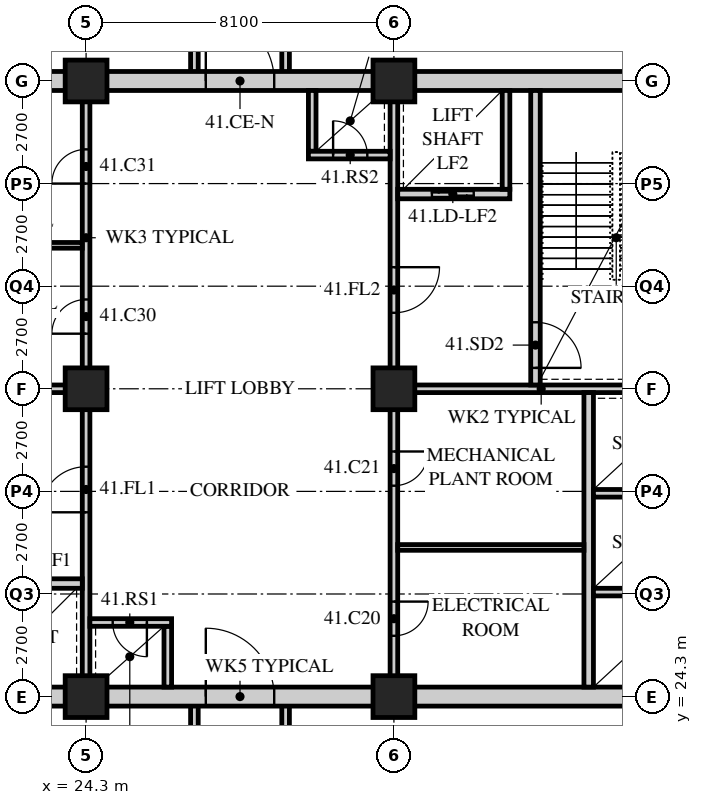
"""IFC4 building model, lengths in metres.
Left out: names, types, materials, properties, quantities, classifications, styles, units other than length and angle.
Written with IfcOpenShell. Run it as: python <this file> out.ifc"""

import sys

from ifc_helpers import new_model, si_unit, direction, frame, frame_2d, origin, origin_2d, place, context, subcontext, project, spatial, rectangle, hollow_rectangle, extrude, element, fill, save


model = new_model("IFC4")
c1 = context("Model", 3, precision=1e-05, world=origin(), true_north=direction((0.0, 1.0)))
c2 = subcontext(c1, "Body", "Model", "MODEL_VIEW")
j1 = project(units=[si_unit("LENGTHUNIT", "METRE"), si_unit("PLANEANGLEUNIT", "RADIAN")], contexts=[c1])
p1 = place(None, origin())
s1 = spatial("IfcSite", under=j1, at=p1, CompositionType="ELEMENT")
p2 = place(p1, origin())
s2 = spatial("IfcBuilding", under=s1, at=p2, CompositionType="ELEMENT")
p3 = place(p2, frame((0.0, 0.0, 157.8)))
s3 = spatial("IfcBuildingStorey", under=s2, at=p3, CompositionType="ELEMENT", Elevation=157.8)
for number, where, z_axis, x_axis in (
    (1, (24.3, 24.3, 0.0), (0.0, 0.0, 1.0), (1.0, 0.0, 0.0)),
    (2, (24.3, 32.4, 0.0), (0.0, 0.0, 1.0), (1.0, 0.0, 0.0)),
    (3, (24.3, 40.5, 0.0), (0.0, 0.0, 1.0), (1.0, 0.0, 0.0)),
    (4, (32.4, 24.3, 0.0), (0.0, 0.0, 1.0), (1.0, 0.0, 0.0)),
    (5, (32.4, 32.4, 0.0), (0.0, 0.0, 1.0), (1.0, 0.0, 0.0)),
    (6, (32.4, 40.5, 0.0), (0.0, 0.0, 1.0), (1.0, 0.0, 0.0)),
):
    element("IfcColumn", number, at=place(p3, frame(where, z_axis=z_axis, x_axis=x_axis)), inside=s3, PredefinedType="COLUMN", context=c2, shape_type="SweptSolid", body=[
        extrude(hollow_rectangle(XDim=1.1, YDim=1.1, WallThickness=0.1, at=origin_2d()), origin(), (0.0, 0.0, 1.0), 7.2),
    ])
for number, where, z_axis, x_axis in (
    (7, (27.15, 15.3, 0.0), (0.0, 0.0, 1.0), (0.0, 1.0, 0.0)),
    (8, (29.55, 15.3, 0.0), (0.0, 0.0, 1.0), (0.0, 1.0, 0.0)),
):
    element("IfcWall", number, at=place(p3, frame(where, z_axis=z_axis, x_axis=x_axis)), inside=s3, PredefinedType="SOLIDWALL", context=c2, shape_type="SweptSolid", body=[
        extrude(rectangle(XDim=9.0, YDim=0.2, at=frame_2d((4.5, 0.0))), origin(), (0.0, 0.0, 1.0), 6.95),
    ])
for number, where, z_axis, x_axis in (
    (9, (27.15, 40.5, 0.0), (0.0, 0.0, 1.0), (0.0, 1.0, 0.0)),
    (10, (29.55, 40.5, 0.0), (0.0, 0.0, 1.0), (0.0, 1.0, 0.0)),
):
    element("IfcWall", number, at=place(p3, frame(where, z_axis=z_axis, x_axis=x_axis)), inside=s3, PredefinedType="SOLIDWALL", context=c2, shape_type="SweptSolid", body=[
        extrude(rectangle(XDim=3.6, YDim=0.2, at=frame_2d((1.8, 0.0))), origin(), (0.0, 0.0, 1.0), 6.95),
    ])
p4 = place(p3, frame((15.95, 24.3, 0.0), z_axis=(0.0, 0.0, 1.0), x_axis=(1.0, 0.0, 0.0)))
e11 = element("IfcWall", 11, at=p4, inside=s3, PredefinedType="SOLIDWALL", context=c2, shape_type="SweptSolid", body=[
    extrude(rectangle(XDim=24.8, YDim=0.5, at=frame_2d((12.4, 0.0))), origin(), (0.0, 0.0, 1.0), 6.18),
])
p5 = place(p4, frame((11.5, 0.0, 0.0)))
e12 = element("IfcOpeningElement", 12, at=p5, cuts=e11, PredefinedType="OPENING", context=c2, shape_type="SweptSolid", body=[
    extrude(rectangle(XDim=1.8, YDim=2.4, at=frame_2d((0.9, 1.2))), frame((0.0, 0.26, 0.0), z_axis=(0.0, -1.0, 0.0), x_axis=(1.0, 0.0, 0.0)), (0.0, 0.0, 1.0), 0.52),
])
p6 = place(p3, frame((15.95, 40.5, 0.0), z_axis=(0.0, 0.0, 1.0), x_axis=(1.0, 0.0, 0.0)))
e13 = element("IfcWall", 13, at=p6, inside=s3, PredefinedType="SOLIDWALL", context=c2, shape_type="SweptSolid", body=[
    extrude(rectangle(XDim=24.8, YDim=0.5, at=frame_2d((12.4, 0.0))), origin(), (0.0, 0.0, 1.0), 6.18),
])
p7 = place(p6, frame((11.5, 0.0, 0.0)))
e14 = element("IfcOpeningElement", 14, at=p7, cuts=e13, PredefinedType="OPENING", context=c2, shape_type="SweptSolid", body=[
    extrude(rectangle(XDim=1.8, YDim=2.4, at=frame_2d((0.9, 1.2))), frame((0.0, 0.26, 0.0), z_axis=(0.0, -1.0, 0.0), x_axis=(1.0, 0.0, 0.0)), (0.0, 0.0, 1.0), 0.52),
])
p8 = place(p3, frame((16.45, 32.4, 0.0), z_axis=(0.0, 0.0, 1.0), x_axis=(1.0, 0.0, 0.0)))
e15 = element("IfcWall", 15, at=p8, inside=s3, PredefinedType="SOLIDWALL", context=c2, shape_type="SweptSolid", body=[
    extrude(rectangle(XDim=7.95, YDim=0.2, at=frame_2d((3.975, 0.0))), origin(), (0.0, 0.0, 1.0), 6.25),
])
p9 = place(p3, frame((24.3, 24.55, 0.0), z_axis=(0.0, 0.0, 1.0), x_axis=(0.0, 1.0, 0.0)))
e16 = element("IfcWall", 16, at=p9, inside=s3, PredefinedType="SOLIDWALL", context=c2, shape_type="SweptSolid", body=[
    extrude(rectangle(XDim=7.75, YDim=0.2, at=frame_2d((3.875, 0.0))), origin(), (0.0, 0.0, 1.0), 6.25),
])
p10 = place(p9, frame((4.6, 0.0, 0.0)))
e17 = element("IfcOpeningElement", 17, at=p10, cuts=e16, PredefinedType="OPENING", context=c2, shape_type="SweptSolid", body=[
    extrude(rectangle(XDim=1.2, YDim=2.1, at=frame_2d((0.6, 1.05))), frame((0.0, 0.11, 0.0), z_axis=(0.0, -1.0, 0.0), x_axis=(1.0, 0.0, 0.0)), (0.0, 0.0, 1.0), 0.22),
])
p11 = place(p3, frame((21.25, 27.275, 0.0), z_axis=(0.0, 0.0, 1.0), x_axis=(1.0, 0.0, 0.0)))
e18 = element("IfcWall", 18, at=p11, inside=s3, PredefinedType="SOLIDWALL", context=c2, shape_type="SweptSolid", body=[
    extrude(rectangle(XDim=2.95, YDim=0.25, at=frame_2d((1.475, 0.0))), origin(), (0.0, 0.0, 1.0), 6.95),
])
p12 = place(p11, frame((0.95, 0.0, 0.0)))
e19 = element("IfcOpeningElement", 19, at=p12, cuts=e18, PredefinedType="OPENING", context=c2, shape_type="SweptSolid", body=[
    extrude(rectangle(XDim=1.1, YDim=2.4, at=frame_2d((0.55, 1.2))), frame((0.0, 0.135, 0.0), z_axis=(0.0, -1.0, 0.0), x_axis=(1.0, 0.0, 0.0)), (0.0, 0.0, 1.0), 0.27),
])
p13 = place(p3, frame((26.45, 24.55, 0.0), z_axis=(0.0, 0.0, 1.0), x_axis=(0.0, 1.0, 0.0)))
e20 = element("IfcWall", 20, at=p13, inside=s3, PredefinedType="SOLIDWALL", context=c2, shape_type="SweptSolid", body=[
    extrude(rectangle(XDim=1.6, YDim=0.2, at=frame_2d((0.8, 0.0))), origin(), (0.0, 0.0, 1.0), 6.95),
])
p14 = place(p3, frame((24.4, 26.25, 0.0), z_axis=(0.0, 0.0, 1.0), x_axis=(1.0, 0.0, 0.0)))
e21 = element("IfcWall", 21, at=p14, inside=s3, PredefinedType="SOLIDWALL", context=c2, shape_type="SweptSolid", body=[
    extrude(rectangle(XDim=2.15, YDim=0.2, at=frame_2d((1.075, 0.0))), origin(), (0.0, 0.0, 1.0), 6.95),
])
p15 = place(p14, frame((0.6, 0.0, 0.0)))
e22 = element("IfcOpeningElement", 22, at=p15, cuts=e21, PredefinedType="OPENING", context=c2, shape_type="SweptSolid", body=[
    extrude(rectangle(XDim=0.9, YDim=2.1, at=frame_2d((0.45, 1.05))), frame((0.0, 0.11, 0.0), z_axis=(0.0, -1.0, 0.0), x_axis=(1.0, 0.0, 0.0)), (0.0, 0.0, 1.0), 0.22),
])
p16 = place(p3, frame((32.3, 32.4, 0.0), z_axis=(0.0, 0.0, 1.0), x_axis=(1.0, 0.0, 0.0)))
e23 = element("IfcWall", 23, at=p16, inside=s3, PredefinedType="SOLIDWALL", context=c2, shape_type="SweptSolid", body=[
    extrude(rectangle(XDim=7.95, YDim=0.2, at=frame_2d((3.975, 0.0))), origin(), (0.0, 0.0, 1.0), 6.25),
])
p17 = place(p3, frame((32.4, 32.5, 0.0), z_axis=(0.0, 0.0, 1.0), x_axis=(0.0, 1.0, 0.0)))
e24 = element("IfcWall", 24, at=p17, inside=s3, PredefinedType="SOLIDWALL", context=c2, shape_type="SweptSolid", body=[
    extrude(rectangle(XDim=7.75, YDim=0.2, at=frame_2d((3.875, 0.0))), origin(), (0.0, 0.0, 1.0), 6.25),
])
p18 = place(p17, frame((1.9, 0.0, 0.0)))
e25 = element("IfcOpeningElement", 25, at=p18, cuts=e24, PredefinedType="OPENING", context=c2, shape_type="SweptSolid", body=[
    extrude(rectangle(XDim=1.2, YDim=2.1, at=frame_2d((0.6, 1.05))), frame((0.0, 0.11, 0.0), z_axis=(0.0, -1.0, 0.0), x_axis=(1.0, 0.0, 0.0)), (0.0, 0.0, 1.0), 0.22),
])
p19 = place(p3, frame((37.525, 24.55, 0.0), z_axis=(0.0, 0.0, 1.0), x_axis=(0.0, 1.0, 0.0)))
e26 = element("IfcWall", 26, at=p19, inside=s3, PredefinedType="SOLIDWALL", context=c2, shape_type="SweptSolid", body=[
    extrude(rectangle(XDim=7.75, YDim=0.25, at=frame_2d((3.875, 0.0))), origin(), (0.0, 0.0, 1.0), 6.95),
])
for number, where, z_axis, x_axis in (
    (27, (37.65, 27.05, 0.0), (0.0, 0.0, 1.0), (1.0, 0.0, 0.0)),
    (28, (37.65, 29.65, 0.0), (0.0, 0.0, 1.0), (1.0, 0.0, 0.0)),
):
    element("IfcWall", number, at=place(p3, frame(where, z_axis=z_axis, x_axis=x_axis)), inside=s3, PredefinedType="SOLIDWALL", context=c2, shape_type="SweptSolid", body=[
        extrude(rectangle(XDim=2.6, YDim=0.2, at=frame_2d((1.3, 0.0))), origin(), (0.0, 0.0, 1.0), 6.95),
    ])
p20 = place(p3, frame((36.125, 32.5, 0.0), z_axis=(0.0, 0.0, 1.0), x_axis=(0.0, 1.0, 0.0)))
e29 = element("IfcWall", 29, at=p20, inside=s3, PredefinedType="SOLIDWALL", context=c2, shape_type="SweptSolid", body=[
    extrude(rectangle(XDim=7.75, YDim=0.25, at=frame_2d((3.875, 0.0))), origin(), (0.0, 0.0, 1.0), 6.95),
])
p21 = place(p20, frame((0.45, 0.0, 0.0)))
e30 = element("IfcOpeningElement", 30, at=p21, cuts=e29, PredefinedType="OPENING", context=c2, shape_type="SweptSolid", body=[
    extrude(rectangle(XDim=1.2, YDim=2.1, at=frame_2d((0.6, 1.05))), frame((0.0, 0.135, 0.0), z_axis=(0.0, -1.0, 0.0), x_axis=(1.0, 0.0, 0.0)), (0.0, 0.0, 1.0), 0.27),
])
p22 = place(p3, frame((32.5, 37.525, 0.0), z_axis=(0.0, 0.0, 1.0), x_axis=(1.0, 0.0, 0.0)))
e31 = element("IfcWall", 31, at=p22, inside=s3, PredefinedType="SOLIDWALL", context=c2, shape_type="SweptSolid", body=[
    extrude(rectangle(XDim=2.95, YDim=0.25, at=frame_2d((1.475, 0.0))), origin(), (0.0, 0.0, 1.0), 6.95),
])
p23 = place(p22, frame((0.9, 0.0, 0.0)))
e32 = element("IfcOpeningElement", 32, at=p23, cuts=e31, PredefinedType="OPENING", context=c2, shape_type="SweptSolid", body=[
    extrude(rectangle(XDim=1.1, YDim=2.4, at=frame_2d((0.55, 1.2))), frame((0.0, 0.135, 0.0), z_axis=(0.0, -1.0, 0.0), x_axis=(1.0, 0.0, 0.0)), (0.0, 0.0, 1.0), 0.27),
])
p24 = place(p3, frame((35.35, 37.65, 0.0), z_axis=(0.0, 0.0, 1.0), x_axis=(0.0, 1.0, 0.0)))
e33 = element("IfcWall", 33, at=p24, inside=s3, PredefinedType="SOLIDWALL", context=c2, shape_type="SweptSolid", body=[
    extrude(rectangle(XDim=2.6, YDim=0.2, at=frame_2d((1.3, 0.0))), origin(), (0.0, 0.0, 1.0), 6.95),
])
p25 = place(p3, frame((30.25, 38.65, 0.0), z_axis=(0.0, 0.0, 1.0), x_axis=(0.0, 1.0, 0.0)))
e34 = element("IfcWall", 34, at=p25, inside=s3, PredefinedType="SOLIDWALL", context=c2, shape_type="SweptSolid", body=[
    extrude(rectangle(XDim=1.6, YDim=0.2, at=frame_2d((0.8, 0.0))), origin(), (0.0, 0.0, 1.0), 6.95),
])
p26 = place(p3, frame((30.15, 38.55, 0.0), z_axis=(0.0, 0.0, 1.0), x_axis=(1.0, 0.0, 0.0)))
e35 = element("IfcWall", 35, at=p26, inside=s3, PredefinedType="SOLIDWALL", context=c2, shape_type="SweptSolid", body=[
    extrude(rectangle(XDim=2.15, YDim=0.2, at=frame_2d((1.075, 0.0))), origin(), (0.0, 0.0, 1.0), 6.95),
])
p27 = place(p26, frame((0.65, 0.0, 0.0)))
e36 = element("IfcOpeningElement", 36, at=p27, cuts=e35, PredefinedType="OPENING", context=c2, shape_type="SweptSolid", body=[
    extrude(rectangle(XDim=0.9, YDim=2.1, at=frame_2d((0.45, 1.05))), frame((0.0, 0.11, 0.0), z_axis=(0.0, -1.0, 0.0), x_axis=(1.0, 0.0, 0.0)), (0.0, 0.0, 1.0), 0.22),
])
p28 = place(p3, frame((24.3, 32.5, 0.0), z_axis=(0.0, 0.0, 1.0), x_axis=(0.0, 1.0, 0.0)))
e37 = element("IfcWall", 37, at=p28, inside=s3, PredefinedType="PARTITIONING", context=c2, shape_type="SweptSolid", body=[
    extrude(rectangle(XDim=7.75, YDim=0.2, at=frame_2d((3.875, 0.0))), origin(), (0.0, 0.0, 1.0), 6.25),
])
p29 = place(p28, frame((1.35, 0.0, 0.0)))
e38 = element("IfcOpeningElement", 38, at=p29, cuts=e37, PredefinedType="OPENING", context=c2, shape_type="SweptSolid", body=[
    extrude(rectangle(XDim=0.9, YDim=2.1, at=frame_2d((0.45, 1.05))), frame((0.0, 0.11, 0.0), z_axis=(0.0, -1.0, 0.0), x_axis=(1.0, 0.0, 0.0)), (0.0, 0.0, 1.0), 0.22),
])
p30 = place(p28, frame((5.3, 0.0, 0.0)))
e39 = element("IfcOpeningElement", 39, at=p30, cuts=e37, PredefinedType="OPENING", context=c2, shape_type="SweptSolid", body=[
    extrude(rectangle(XDim=0.9, YDim=2.1, at=frame_2d((0.45, 1.05))), frame((0.0, 0.11, 0.0), z_axis=(0.0, -1.0, 0.0), x_axis=(1.0, 0.0, 0.0)), (0.0, 0.0, 1.0), 0.22),
])
p31 = place(p3, frame((19.3, 36.175, 0.0), z_axis=(0.0, 0.0, 1.0), x_axis=(1.0, 0.0, 0.0)))
e40 = element("IfcWall", 40, at=p31, inside=s3, PredefinedType="PARTITIONING", context=c2, shape_type="SweptSolid", body=[
    extrude(rectangle(XDim=4.9, YDim=0.15, at=frame_2d((2.45, 0.0))), origin(), (0.0, 0.0, 1.0), 6.95),
])
p32 = place(p3, frame((32.4, 24.55, 0.0), z_axis=(0.0, 0.0, 1.0), x_axis=(0.0, 1.0, 0.0)))
e41 = element("IfcWall", 41, at=p32, inside=s3, PredefinedType="PARTITIONING", context=c2, shape_type="SweptSolid", body=[
    extrude(rectangle(XDim=7.75, YDim=0.2, at=frame_2d((3.875, 0.0))), origin(), (0.0, 0.0, 1.0), 6.25),
])
p33 = place(p32, frame((1.35, 0.0, 0.0)))
e42 = element("IfcOpeningElement", 42, at=p33, cuts=e41, PredefinedType="OPENING", context=c2, shape_type="SweptSolid", body=[
    extrude(rectangle(XDim=0.9, YDim=2.1, at=frame_2d((0.45, 1.05))), frame((0.0, 0.11, 0.0), z_axis=(0.0, -1.0, 0.0), x_axis=(1.0, 0.0, 0.0)), (0.0, 0.0, 1.0), 0.22),
])
p34 = place(p32, frame((5.3, 0.0, 0.0)))
e43 = element("IfcOpeningElement", 43, at=p34, cuts=e41, PredefinedType="OPENING", context=c2, shape_type="SweptSolid", body=[
    extrude(rectangle(XDim=0.9, YDim=2.1, at=frame_2d((0.45, 1.05))), frame((0.0, 0.11, 0.0), z_axis=(0.0, -1.0, 0.0), x_axis=(1.0, 0.0, 0.0)), (0.0, 0.0, 1.0), 0.22),
])
p35 = place(p3, frame((32.5, 28.225, 0.0), z_axis=(0.0, 0.0, 1.0), x_axis=(1.0, 0.0, 0.0)))
e44 = element("IfcWall", 44, at=p35, inside=s3, PredefinedType="PARTITIONING", context=c2, shape_type="SweptSolid", body=[
    extrude(rectangle(XDim=4.9, YDim=0.15, at=frame_2d((2.45, 0.0))), origin(), (0.0, 0.0, 1.0), 6.95),
])
p36 = place(p29, origin())
e45 = element("IfcDoor", 45, at=p36, inside=s3, OperationType="SINGLE_SWING_LEFT", PredefinedType="DOOR", context=c2, shape_type="SweptSolid", body=[
    extrude(rectangle(XDim=0.9, YDim=2.1, at=frame_2d((0.45, 1.05))), frame((0.0, 0.025, 0.0), z_axis=(0.0, -1.0, 0.0), x_axis=(1.0, 0.0, 0.0)), (0.0, 0.0, 1.0), 0.05),
])
fill(e38, e45)
p37 = place(p30, origin())
e46 = element("IfcDoor", 46, at=p37, inside=s3, OperationType="SINGLE_SWING_LEFT", PredefinedType="DOOR", context=c2, shape_type="SweptSolid", body=[
    extrude(rectangle(XDim=0.9, YDim=2.1, at=frame_2d((0.45, 1.05))), frame((0.0, 0.025, 0.0), z_axis=(0.0, -1.0, 0.0), x_axis=(1.0, 0.0, 0.0)), (0.0, 0.0, 1.0), 0.05),
])
fill(e39, e46)
p38 = place(p33, origin())
e47 = element("IfcDoor", 47, at=p38, inside=s3, OperationType="SINGLE_SWING_LEFT", PredefinedType="DOOR", context=c2, shape_type="SweptSolid", body=[
    extrude(rectangle(XDim=0.9, YDim=2.1, at=frame_2d((0.45, 1.05))), frame((0.0, 0.025, 0.0), z_axis=(0.0, -1.0, 0.0), x_axis=(1.0, 0.0, 0.0)), (0.0, 0.0, 1.0), 0.05),
])
fill(e42, e47)
p39 = place(p34, origin())
e48 = element("IfcDoor", 48, at=p39, inside=s3, OperationType="SINGLE_SWING_LEFT", PredefinedType="DOOR", context=c2, shape_type="SweptSolid", body=[
    extrude(rectangle(XDim=0.9, YDim=2.1, at=frame_2d((0.45, 1.05))), frame((0.0, 0.025, 0.0), z_axis=(0.0, -1.0, 0.0), x_axis=(1.0, 0.0, 0.0)), (0.0, 0.0, 1.0), 0.05),
])
fill(e43, e48)
p40 = place(p10, origin())
e49 = element("IfcDoor", 49, at=p40, inside=s3, OperationType="SINGLE_SWING_LEFT", PredefinedType="DOOR", context=c2, shape_type="SweptSolid", body=[
    extrude(rectangle(XDim=1.2, YDim=2.1, at=frame_2d((0.6, 1.05))), frame((0.0, 0.025, 0.0), z_axis=(0.0, -1.0, 0.0), x_axis=(1.0, 0.0, 0.0)), (0.0, 0.0, 1.0), 0.05),
])
fill(e17, e49)
p41 = place(p15, origin())
e50 = element("IfcDoor", 50, at=p41, inside=s3, OperationType="SINGLE_SWING_LEFT", PredefinedType="DOOR", context=c2, shape_type="SweptSolid", body=[
    extrude(rectangle(XDim=0.9, YDim=2.1, at=frame_2d((0.45, 1.05))), frame((0.0, 0.025, 0.0), z_axis=(0.0, -1.0, 0.0), x_axis=(1.0, 0.0, 0.0)), (0.0, 0.0, 1.0), 0.05),
])
fill(e22, e50)
p42 = place(p21, origin())
e51 = element("IfcDoor", 51, at=p42, inside=s3, OperationType="SINGLE_SWING_RIGHT", PredefinedType="DOOR", context=c2, shape_type="SweptSolid", body=[
    extrude(rectangle(XDim=1.2, YDim=2.1, at=frame_2d((0.6, 1.05))), frame((0.0, 0.025, 0.0), z_axis=(0.0, -1.0, 0.0), x_axis=(1.0, 0.0, 0.0)), (0.0, 0.0, 1.0), 0.05),
])
fill(e30, e51)
p43 = place(p18, origin())
e52 = element("IfcDoor", 52, at=p43, inside=s3, OperationType="SINGLE_SWING_LEFT", PredefinedType="DOOR", context=c2, shape_type="SweptSolid", body=[
    extrude(rectangle(XDim=1.2, YDim=2.1, at=frame_2d((0.6, 1.05))), frame((0.0, 0.025, 0.0), z_axis=(0.0, -1.0, 0.0), x_axis=(1.0, 0.0, 0.0)), (0.0, 0.0, 1.0), 0.05),
])
fill(e25, e52)
p44 = place(p27, origin())
e53 = element("IfcDoor", 53, at=p44, inside=s3, OperationType="SINGLE_SWING_LEFT", PredefinedType="DOOR", context=c2, shape_type="SweptSolid", body=[
    extrude(rectangle(XDim=0.9, YDim=2.1, at=frame_2d((0.45, 1.05))), frame((0.0, 0.025, 0.0), z_axis=(0.0, -1.0, 0.0), x_axis=(1.0, 0.0, 0.0)), (0.0, 0.0, 1.0), 0.05),
])
fill(e36, e53)
p45 = place(p23, origin())
e54 = element("IfcDoor", 54, at=p45, inside=s3, OperationType="DOUBLE_DOOR_SLIDING", PredefinedType="DOOR", context=c2, shape_type="SweptSolid", body=[
    extrude(rectangle(XDim=1.1, YDim=2.4, at=frame_2d((0.55, 1.2))), frame((0.0, 0.025, 0.0), z_axis=(0.0, -1.0, 0.0), x_axis=(1.0, 0.0, 0.0)), (0.0, 0.0, 1.0), 0.05),
])
fill(e32, e54)
p46 = place(p5, origin())
e55 = element("IfcDoor", 55, at=p46, inside=s3, OperationType="DOUBLE_DOOR_SINGLE_SWING", PredefinedType="DOOR", context=c2, shape_type="SweptSolid", body=[
    extrude(rectangle(XDim=1.8, YDim=2.4, at=frame_2d((0.9, 1.2))), frame((0.0, 0.025, 0.0), z_axis=(0.0, -1.0, 0.0), x_axis=(1.0, 0.0, 0.0)), (0.0, 0.0, 1.0), 0.05),
])
fill(e12, e55)
p47 = place(p7, origin())
e56 = element("IfcDoor", 56, at=p47, inside=s3, OperationType="DOUBLE_DOOR_SINGLE_SWING", PredefinedType="DOOR", context=c2, shape_type="SweptSolid", body=[
    extrude(rectangle(XDim=1.8, YDim=2.4, at=frame_2d((0.9, 1.2))), frame((0.0, 0.025, 0.0), z_axis=(0.0, -1.0, 0.0), x_axis=(1.0, 0.0, 0.0)), (0.0, 0.0, 1.0), 0.05),
])
fill(e14, e56)
save(model, sys.argv[1])
